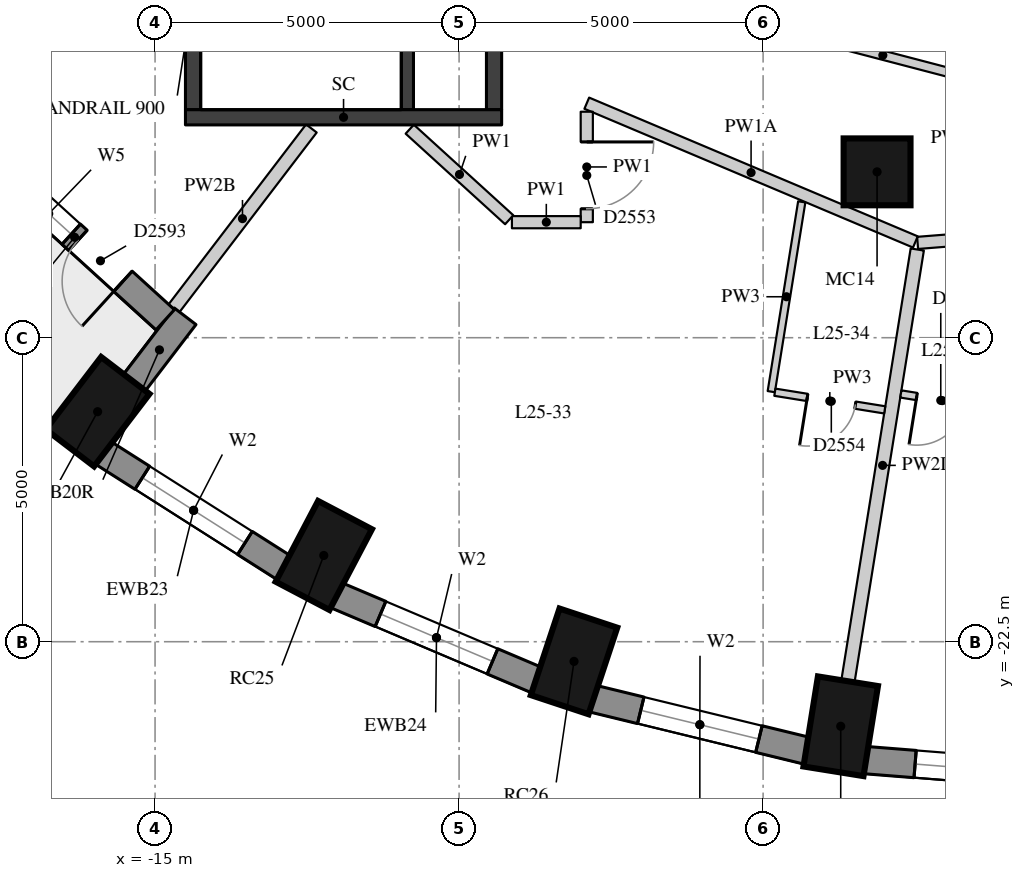
"""IFC4 building model, lengths in metres.
Left out: names, types, materials, properties, quantities, classifications, styles, units other than length and angle.
Written with IfcOpenShell. Run it as: python <this file> out.ifc"""

import sys

from ifc_helpers import new_model, si_unit, direction, frame, frame_2d, origin, origin_2d, place, context, subcontext, project, spatial, rectangle, extrude, element, fill, save


model = new_model("IFC4")
c1 = context("Model", 3, precision=1e-05, world=origin(), true_north=direction((0.0, 1.0)))
c2 = subcontext(c1, "Body", "Model", "MODEL_VIEW")
j1 = project(units=[si_unit("LENGTHUNIT", "METRE"), si_unit("PLANEANGLEUNIT", "RADIAN")], contexts=[c1])
p1 = place(None, origin())
s1 = spatial("IfcSite", under=j1, at=p1, CompositionType="ELEMENT")
p2 = place(p1, origin())
s2 = spatial("IfcBuilding", under=s1, at=p2, CompositionType="ELEMENT")
p3 = place(p2, frame((0.0, 0.0, 92.2)))
s3 = spatial("IfcBuildingStorey", under=s2, at=p3, CompositionType="ELEMENT", Elevation=92.2)
for number, where, z_axis, x_axis in (
    (1, (-15.945, -18.717, 0.0), (0.0, 0.0, 1.0), (-0.607, -0.795, 0.0)),
    (2, (-12.225, -21.082, 0.0), (0.0, 0.0, 1.0), (-0.465, -0.885, 0.0)),
    (3, (-8.11, -22.824, 0.0), (0.0, 0.0, 1.0), (-0.315, -0.949, 0.0)),
    (4, (-3.724, -23.891, 0.0), (0.0, 0.0, 1.0), (-0.159, -0.987, 0.0)),
):
    element("IfcColumn", number, at=place(p3, frame(where, z_axis=z_axis, x_axis=x_axis)), inside=s3, PredefinedType="COLUMN", context=c2, shape_type="SweptSolid", body=[
        extrude(rectangle(XDim=1.5, YDim=1.0, at=origin_2d()), origin(), (0.0, 0.0, 1.0), 3.3),
    ])
p4 = place(p3, frame((-3.126, -14.772, 0.0), z_axis=(0.0, 0.0, 1.0), x_axis=(1.0, 0.0, 0.0)))
e5 = element("IfcColumn", 5, at=p4, inside=s3, PredefinedType="COLUMN", context=c2, shape_type="SweptSolid", body=[
    extrude(rectangle(XDim=1.1, YDim=1.1, at=origin_2d()), origin(), (0.0, 0.0, 1.0), 3.3),
])
p5 = place(p3, frame((-15.856, -19.392, 0.0), z_axis=(0.0, 0.0, 1.0), x_axis=(0.843891947083, -0.53651317006, 0.0)))
e6 = element("IfcWall", 6, at=p5, inside=s3, PredefinedType="SOLIDWALL", context=c2, shape_type="SweptSolid", body=[
    extrude(rectangle(XDim=3.532, YDim=0.45, at=frame_2d((1.766, 0.0))), origin(), (0.0, 0.0, 1.0), 3.02),
])
p6 = place(p5, frame((0.766, 0.0, 0.4)))
e7 = element("IfcOpeningElement", 7, at=p6, cuts=e6, PredefinedType="OPENING", context=c2, shape_type="SweptSolid", body=[
    extrude(rectangle(XDim=2.0, YDim=1.75, at=frame_2d((1.0, 0.875))), frame((0.0, 0.235, 0.0), z_axis=(0.0, -1.0, 0.0), x_axis=(1.0, 0.0, 0.0)), (0.0, 0.0, 1.0), 0.47),
])
p7 = place(p3, frame((-12.025, -21.733, 0.0), z_axis=(0.0, 0.0, 1.0), x_axis=(0.920879975612, -0.389846213932, 0.0)))
e8 = element("IfcWall", 8, at=p7, inside=s3, PredefinedType="SOLIDWALL", context=c2, shape_type="SweptSolid", body=[
    extrude(rectangle(XDim=3.592, YDim=0.45, at=frame_2d((1.796, 0.0))), origin(), (0.0, 0.0, 1.0), 3.02),
])
p8 = place(p7, frame((0.796, 0.0, 0.4)))
e9 = element("IfcOpeningElement", 9, at=p8, cuts=e8, PredefinedType="OPENING", context=c2, shape_type="SweptSolid", body=[
    extrude(rectangle(XDim=2.0, YDim=1.75, at=frame_2d((1.0, 0.875))), frame((0.0, 0.235, 0.0), z_axis=(0.0, -1.0, 0.0), x_axis=(1.0, 0.0, 0.0)), (0.0, 0.0, 1.0), 0.47),
])
p9 = place(p3, frame((-7.807, -23.435, 0.0), z_axis=(0.0, 0.0, 1.0), x_axis=(0.971667603162, -0.236351579148, 0.0)))
e10 = element("IfcWall", 10, at=p9, inside=s3, PredefinedType="SOLIDWALL", context=c2, shape_type="SweptSolid", body=[
    extrude(rectangle(XDim=3.635, YDim=0.45, at=frame_2d((1.817, 0.0))), origin(), (0.0, 0.0, 1.0), 3.02),
])
p10 = place(p9, frame((0.817, 0.0, 0.4)))
e11 = element("IfcOpeningElement", 11, at=p10, cuts=e10, PredefinedType="OPENING", context=c2, shape_type="SweptSolid", body=[
    extrude(rectangle(XDim=2.0, YDim=1.75, at=frame_2d((1.0, 0.875))), frame((0.0, 0.235, 0.0), z_axis=(0.0, -1.0, 0.0), x_axis=(1.0, 0.0, 0.0)), (0.0, 0.0, 1.0), 0.47),
])
p11 = place(p3, frame((-3.327, -24.447, 0.0), z_axis=(0.0, 0.0, 1.0), x_axis=(0.996862216754, -0.079156306178, 0.0)))
e12 = element("IfcWall", 12, at=p11, inside=s3, PredefinedType="SOLIDWALL", context=c2, shape_type="SweptSolid", body=[
    extrude(rectangle(XDim=3.658, YDim=0.45, at=frame_2d((1.829, 0.0))), origin(), (0.0, 0.0, 1.0), 3.02),
])
p12 = place(p11, frame((0.829, 0.0, 0.4)))
e13 = element("IfcOpeningElement", 13, at=p12, cuts=e12, PredefinedType="OPENING", context=c2, shape_type="SweptSolid", body=[
    extrude(rectangle(XDim=2.0, YDim=1.75, at=frame_2d((1.0, 0.875))), frame((0.0, 0.235, 0.0), z_axis=(0.0, -1.0, 0.0), x_axis=(1.0, 0.0, 0.0)), (0.0, 0.0, 1.0), 0.47),
])
p13 = place(p3, frame((-15.35, -18.253, 0.0), z_axis=(0.0, 0.0, 1.0), x_axis=(0.607026495834, 0.794681592435, 0.0)))
e14 = element("IfcWall", 14, at=p13, inside=s3, PredefinedType="SOLIDWALL", context=c2, shape_type="SweptSolid", body=[
    extrude(rectangle(XDim=1.391, YDim=0.45, at=frame_2d((0.695, 0.0))), origin(), (0.0, 0.0, 1.0), 2.57),
])
p14 = place(p3, frame((-17.814, -14.491, 0.0), z_axis=(0.0, 0.0, 1.0), x_axis=(0.73951517403, -0.673139886933, 0.0)))
e15 = element("IfcWall", 15, at=p14, inside=s3, PredefinedType="SOLIDWALL", context=c2, shape_type="SweptSolid", body=[
    extrude(rectangle(XDim=4.031, YDim=0.45, at=frame_2d((2.016, 0.0))), origin(), (0.0, 0.0, 1.0), 3.02),
])
p15 = place(p14, frame((0.941, 0.0, 0.4)))
e16 = element("IfcOpeningElement", 16, at=p15, cuts=e15, PredefinedType="OPENING", context=c2, shape_type="SweptSolid", body=[
    extrude(rectangle(XDim=1.0, YDim=1.75, at=frame_2d((0.5, 0.875))), frame((0.0, 0.235, 0.0), z_axis=(0.0, -1.0, 0.0), x_axis=(1.0, 0.0, 0.0)), (0.0, 0.0, 1.0), 0.47),
])
p16 = place(p14, frame((2.091, 0.0, 0.0)))
e17 = element("IfcOpeningElement", 17, at=p16, cuts=e15, PredefinedType="OPENING", context=c2, shape_type="SweptSolid", body=[
    extrude(rectangle(XDim=1.0, YDim=2.15, at=frame_2d((0.5, 1.075))), frame((0.0, 0.235, 0.0), z_axis=(0.0, -1.0, 0.0), x_axis=(1.0, 0.0, 0.0)), (0.0, 0.0, 1.0), 0.47),
])
p17 = place(p3, frame((-10.85, -13.75, 0.0), z_axis=(0.0, 0.0, 1.0), x_axis=(0.0, 1.0, 0.0)))
e18 = element("IfcWall", 18, at=p17, inside=s3, PredefinedType="SHEAR", context=c2, shape_type="SweptSolid", body=[
    extrude(rectangle(XDim=6.0, YDim=0.2, at=frame_2d((3.0, 0.0))), origin(), (0.0, 0.0, 1.0), 3.02),
])
p18 = place(p17, frame((4.4, 0.0, 0.0)))
e19 = element("IfcOpeningElement", 19, at=p18, cuts=e18, PredefinedType="OPENING", context=c2, shape_type="SweptSolid", body=[
    extrude(rectangle(XDim=1.5, YDim=2.1, at=frame_2d((0.75, 1.05))), frame((0.0, 0.11, 0.0), z_axis=(0.0, -1.0, 0.0), x_axis=(1.0, 0.0, 0.0)), (0.0, 0.0, 1.0), 0.22),
])
p19 = place(p3, frame((-14.375, -13.75, -0.28), z_axis=(0.0, 0.0, 1.0), x_axis=(0.0, 1.0, 0.0)))
e20 = element("IfcWall", 20, at=p19, inside=s3, PredefinedType="SHEAR", context=c2, shape_type="SweptSolid", body=[
    extrude(rectangle(XDim=6.0, YDim=0.25, at=frame_2d((3.0, 0.0))), origin(), (0.0, 0.0, 1.0), 3.3),
])
p20 = place(p3, frame((-9.425, -13.75, -0.28), z_axis=(0.0, 0.0, 1.0), x_axis=(0.0, 1.0, 0.0)))
e21 = element("IfcWall", 21, at=p20, inside=s3, PredefinedType="SHEAR", context=c2, shape_type="SweptSolid", body=[
    extrude(rectangle(XDim=6.0, YDim=0.25, at=frame_2d((3.0, 0.0))), origin(), (0.0, 0.0, 1.0), 3.3),
])
p21 = place(p20, frame((2.4, 0.0, 0.28)))
e22 = element("IfcOpeningElement", 22, at=p21, cuts=e21, PredefinedType="OPENING", context=c2, shape_type="SweptSolid", body=[
    extrude(rectangle(XDim=1.5, YDim=2.1, at=frame_2d((0.75, 1.05))), frame((0.0, 0.135, 0.0), z_axis=(0.0, -1.0, 0.0), x_axis=(1.0, 0.0, 0.0)), (0.0, 0.0, 1.0), 0.27),
])
p22 = place(p3, frame((-14.5, -13.875, -0.28), z_axis=(0.0, 0.0, 1.0), x_axis=(1.0, 0.0, 0.0)))
e23 = element("IfcWall", 23, at=p22, inside=s3, PredefinedType="SHEAR", context=c2, shape_type="SweptSolid", body=[
    extrude(rectangle(XDim=5.2, YDim=0.25, at=frame_2d((2.6, 0.0))), origin(), (0.0, 0.0, 1.0), 3.3),
])
p23 = place(p3, frame((7.158, -15.178, 0.0), z_axis=(0.0, 0.0, 1.0), x_axis=(-0.996871915552, -0.0790340685, 0.0)))
e24 = element("IfcWall", 24, at=p23, inside=s3, PredefinedType="PARTITIONING", context=c2, shape_type="SweptSolid", body=[
    extrude(rectangle(XDim=9.647, YDim=0.2, at=frame_2d((4.824, 0.0))), origin(), (0.0, 0.0, 1.0), 3.02),
])
p24 = place(p23, frame((6.588, 0.0, 0.0)))
e25 = element("IfcOpeningElement", 25, at=p24, cuts=e24, PredefinedType="OPENING", context=c2, shape_type="SweptSolid", body=[
    extrude(rectangle(XDim=1.0, YDim=2.1, at=frame_2d((0.5, 1.05))), frame((0.0, 0.11, 0.0), z_axis=(0.0, -1.0, 0.0), x_axis=(1.0, 0.0, 0.0)), (0.0, 0.0, 1.0), 0.22),
])
p25 = place(p23, frame((4.855, 0.0, 0.0)))
e26 = element("IfcOpeningElement", 26, at=p25, cuts=e24, PredefinedType="OPENING", context=c2, shape_type="SweptSolid", body=[
    extrude(rectangle(XDim=0.9, YDim=2.1, at=frame_2d((0.45, 1.05))), frame((0.0, 0.11, 0.0), z_axis=(0.0, -1.0, 0.0), x_axis=(1.0, 0.0, 0.0)), (0.0, 0.0, 1.0), 0.22),
])
p26 = place(p23, frame((0.22, 0.0, 0.0)))
e27 = element("IfcOpeningElement", 27, at=p26, cuts=e24, PredefinedType="OPENING", context=c2, shape_type="SweptSolid", body=[
    extrude(rectangle(XDim=1.1, YDim=2.1, at=frame_2d((0.55, 1.05))), frame((0.0, 0.11, 0.0), z_axis=(0.0, -1.0, 0.0), x_axis=(1.0, 0.0, 0.0)), (0.0, 0.0, 1.0), 0.22),
])
p27 = place(p3, frame((-2.496, -15.925, 0.0), z_axis=(0.0, 0.0, 1.0), x_axis=(-0.921239287596, 0.388996368864, 0.0)))
e28 = element("IfcWall", 28, at=p27, inside=s3, PredefinedType="PARTITIONING", context=c2, shape_type="SweptSolid", body=[
    extrude(rectangle(XDim=5.866, YDim=0.2, at=frame_2d((2.933, 0.0))), origin(), (0.0, 0.0, 1.0), 2.57),
])
p28 = place(p3, frame((-7.9, -13.783, 0.0), z_axis=(0.0, 0.0, 1.0), x_axis=(0.0, -1.0, 0.0)))
e29 = element("IfcWall", 29, at=p28, inside=s3, PredefinedType="PARTITIONING", context=c2, shape_type="SweptSolid", body=[
    extrude(rectangle(XDim=1.817, YDim=0.2, at=frame_2d((0.908, 0.0))), origin(), (0.0, 0.0, 1.0), 3.02),
])
p29 = place(p28, frame((0.497, 0.0, 0.0)))
e30 = element("IfcOpeningElement", 30, at=p29, cuts=e29, PredefinedType="OPENING", context=c2, shape_type="SweptSolid", body=[
    extrude(rectangle(XDim=1.1, YDim=2.1, at=frame_2d((0.55, 1.05))), frame((0.0, 0.11, 0.0), z_axis=(0.0, -1.0, 0.0), x_axis=(1.0, 0.0, 0.0)), (0.0, 0.0, 1.0), 0.22),
])
p30 = place(p3, frame((-8.0, -15.6, 0.0), z_axis=(0.0, 0.0, 1.0), x_axis=(-1.0, 0.0, 0.0)))
e31 = element("IfcWall", 31, at=p30, inside=s3, PredefinedType="PARTITIONING", context=c2, shape_type="SweptSolid", body=[
    extrude(rectangle(XDim=1.131, YDim=0.2, at=frame_2d((0.565, 0.0))), origin(), (0.0, 0.0, 1.0), 3.02),
])
p31 = place(p3, frame((-9.176, -15.56, 0.0), z_axis=(0.0, 0.0, 1.0), x_axis=(-0.73943556447, 0.673227336044, 0.0)))
e32 = element("IfcWall", 32, at=p31, inside=s3, PredefinedType="PARTITIONING", context=c2, shape_type="SweptSolid", body=[
    extrude(rectangle(XDim=2.212, YDim=0.2, at=frame_2d((1.106, 0.0))), origin(), (0.0, 0.0, 1.0), 3.02),
])
p32 = place(p3, frame((-1.644, -13.217, 0.0), z_axis=(0.0, 0.0, 1.0), x_axis=(-0.967446197993, 0.253076774891, 0.0)))
e33 = element("IfcWall", 33, at=p32, inside=s3, PredefinedType="PARTITIONING", context=c2, shape_type="SweptSolid", body=[
    extrude(rectangle(XDim=2.868, YDim=0.15, at=frame_2d((1.434, 0.0))), origin(), (0.0, 0.0, 1.0), 3.02),
])
p33 = place(p3, frame((-14.696, -17.025, 0.0), z_axis=(0.0, 0.0, 1.0), x_axis=(0.607059278405, 0.794656550028, 0.0)))
e34 = element("IfcWall", 34, at=p33, inside=s3, PredefinedType="PARTITIONING", context=c2, shape_type="SweptSolid", body=[
    extrude(rectangle(XDim=3.734, YDim=0.22, at=frame_2d((1.867, 0.0))), origin(), (0.0, 0.0, 1.0), 2.57),
])
p34 = place(p3, frame((-3.605, -23.15, 0.0), z_axis=(0.0, 0.0, 1.0), x_axis=(0.158533314299, 0.987353628776, 0.0)))
e35 = element("IfcWall", 35, at=p34, inside=s3, PredefinedType="PARTITIONING", context=c2, shape_type="SweptSolid", body=[
    extrude(rectangle(XDim=7.192, YDim=0.22, at=frame_2d((3.596, 0.0))), origin(), (0.0, 0.0, 1.0), 2.47),
])
p35 = place(p3, frame((-4.365, -15.266, 0.0), z_axis=(0.0, 0.0, 1.0), x_axis=(-0.158535604942, -0.987353260979, 0.0)))
e36 = element("IfcWall", 36, at=p35, inside=s3, PredefinedType="PARTITIONING", context=c2, shape_type="SweptSolid", body=[
    extrude(rectangle(XDim=3.162, YDim=0.12, at=frame_2d((1.581, 0.0))), origin(), (0.0, 0.0, 1.0), 3.02),
])
p36 = place(p3, frame((-4.806, -18.397, 0.0), z_axis=(0.0, 0.0, 1.0), x_axis=(0.987339700129, -0.158620038299, 0.0)))
e37 = element("IfcWall", 37, at=p36, inside=s3, PredefinedType="PARTITIONING", context=c2, shape_type="SweptSolid", body=[
    extrude(rectangle(XDim=1.83, YDim=0.12, at=frame_2d((0.915, 0.0))), origin(), (0.0, 0.0, 1.0), 3.02),
])
p37 = place(p36, frame((0.54, 0.0, 0.0)))
e38 = element("IfcOpeningElement", 38, at=p37, cuts=e37, PredefinedType="OPENING", context=c2, shape_type="SweptSolid", body=[
    extrude(rectangle(XDim=0.8, YDim=2.1, at=frame_2d((0.4, 1.05))), frame((0.0, 0.07, 0.0), z_axis=(0.0, -1.0, 0.0), x_axis=(1.0, 0.0, 0.0)), (0.0, 0.0, 1.0), 0.14),
])
p38 = place(p3, frame((-1.372, -18.644, 0.0), z_axis=(0.0, 0.0, 1.0), x_axis=(-0.987324430422, 0.158715056288, 0.0)))
e39 = element("IfcWall", 39, at=p38, inside=s3, PredefinedType="PARTITIONING", context=c2, shape_type="SweptSolid", body=[
    extrude(rectangle(XDim=1.38, YDim=0.12, at=frame_2d((0.69, 0.0))), origin(), (0.0, 0.0, 1.0), 3.02),
])
p39 = place(p38, frame((0.315, 0.0, 0.0)))
e40 = element("IfcOpeningElement", 40, at=p39, cuts=e39, PredefinedType="OPENING", context=c2, shape_type="SweptSolid", body=[
    extrude(rectangle(XDim=0.8, YDim=2.1, at=frame_2d((0.4, 1.05))), frame((0.0, 0.07, 0.0), z_axis=(0.0, -1.0, 0.0), x_axis=(1.0, 0.0, 0.0)), (0.0, 0.0, 1.0), 0.14),
])
p40 = place(p6, origin())
e41 = element("IfcWindow", 41, at=p40, inside=s3, PartitioningType="SINGLE_PANEL", PredefinedType="WINDOW", context=c2, shape_type="SweptSolid", body=[
    extrude(rectangle(XDim=2.0, YDim=1.75, at=frame_2d((1.0, 0.875))), frame((0.0, 0.035, 0.0), z_axis=(0.0, -1.0, 0.0), x_axis=(1.0, 0.0, 0.0)), (0.0, 0.0, 1.0), 0.06),
])
fill(e7, e41)
p41 = place(p8, origin())
e42 = element("IfcWindow", 42, at=p41, inside=s3, PartitioningType="SINGLE_PANEL", PredefinedType="WINDOW", context=c2, shape_type="SweptSolid", body=[
    extrude(rectangle(XDim=2.0, YDim=1.75, at=frame_2d((1.0, 0.875))), frame((0.0, 0.035, 0.0), z_axis=(0.0, -1.0, 0.0), x_axis=(1.0, 0.0, 0.0)), (0.0, 0.0, 1.0), 0.06),
])
fill(e9, e42)
p42 = place(p10, origin())
e43 = element("IfcWindow", 43, at=p42, inside=s3, PartitioningType="SINGLE_PANEL", PredefinedType="WINDOW", context=c2, shape_type="SweptSolid", body=[
    extrude(rectangle(XDim=2.0, YDim=1.75, at=frame_2d((1.0, 0.875))), frame((0.0, 0.035, 0.0), z_axis=(0.0, -1.0, 0.0), x_axis=(1.0, 0.0, 0.0)), (0.0, 0.0, 1.0), 0.06),
])
fill(e11, e43)
p43 = place(p12, origin())
e44 = element("IfcWindow", 44, at=p43, inside=s3, PartitioningType="SINGLE_PANEL", PredefinedType="WINDOW", context=c2, shape_type="SweptSolid", body=[
    extrude(rectangle(XDim=2.0, YDim=1.75, at=frame_2d((1.0, 0.875))), frame((0.0, 0.035, 0.0), z_axis=(0.0, -1.0, 0.0), x_axis=(1.0, 0.0, 0.0)), (0.0, 0.0, 1.0), 0.06),
])
fill(e13, e44)
p44 = place(p15, origin())
e45 = element("IfcWindow", 45, at=p44, inside=s3, PartitioningType="SINGLE_PANEL", PredefinedType="WINDOW", context=c2, shape_type="SweptSolid", body=[
    extrude(rectangle(XDim=1.0, YDim=1.75, at=frame_2d((0.5, 0.875))), frame((0.0, 0.035, 0.0), z_axis=(0.0, -1.0, 0.0), x_axis=(1.0, 0.0, 0.0)), (0.0, 0.0, 1.0), 0.06),
])
fill(e16, e45)
p45 = place(p16, frame((1.0, 0.0, 0.0), z_axis=(0.0, 0.0, 1.0), x_axis=(-1.0, 0.0, 0.0)))
e46 = element("IfcDoor", 46, at=p45, inside=s3, OperationType="SINGLE_SWING_LEFT", PredefinedType="DOOR", context=c2, shape_type="SweptSolid", body=[
    extrude(rectangle(XDim=1.0, YDim=2.15, at=frame_2d((0.5, 1.075))), frame((0.0, 0.075, 0.0), z_axis=(0.0, -1.0, 0.0), x_axis=(1.0, 0.0, 0.0)), (0.0, 0.0, 1.0), 0.05),
])
fill(e17, e46)
p46 = place(p29, origin())
e47 = element("IfcDoor", 47, at=p46, inside=s3, OperationType="SINGLE_SWING_LEFT", PredefinedType="DOOR", context=c2, shape_type="SweptSolid", body=[
    extrude(rectangle(XDim=1.1, YDim=2.1, at=frame_2d((0.55, 1.05))), frame((0.0, 0.025, 0.0), z_axis=(0.0, -1.0, 0.0), x_axis=(1.0, 0.0, 0.0)), (0.0, 0.0, 1.0), 0.05),
])
fill(e30, e47)
p47 = place(p37, origin())
e48 = element("IfcDoor", 48, at=p47, inside=s3, OperationType="SINGLE_SWING_RIGHT", PredefinedType="DOOR", context=c2, shape_type="SweptSolid", body=[
    extrude(rectangle(XDim=0.8, YDim=2.1, at=frame_2d((0.4, 1.05))), frame((0.0, 0.025, 0.0), z_axis=(0.0, -1.0, 0.0), x_axis=(1.0, 0.0, 0.0)), (0.0, 0.0, 1.0), 0.05),
])
fill(e38, e48)
p48 = place(p39, origin())
e49 = element("IfcDoor", 49, at=p48, inside=s3, OperationType="SINGLE_SWING_RIGHT", PredefinedType="DOOR", context=c2, shape_type="SweptSolid", body=[
    extrude(rectangle(XDim=0.8, YDim=2.1, at=frame_2d((0.4, 1.05))), frame((0.0, 0.025, 0.0), z_axis=(0.0, -1.0, 0.0), x_axis=(1.0, 0.0, 0.0)), (0.0, 0.0, 1.0), 0.05),
])
fill(e40, e49)
save(model, sys.argv[1])
